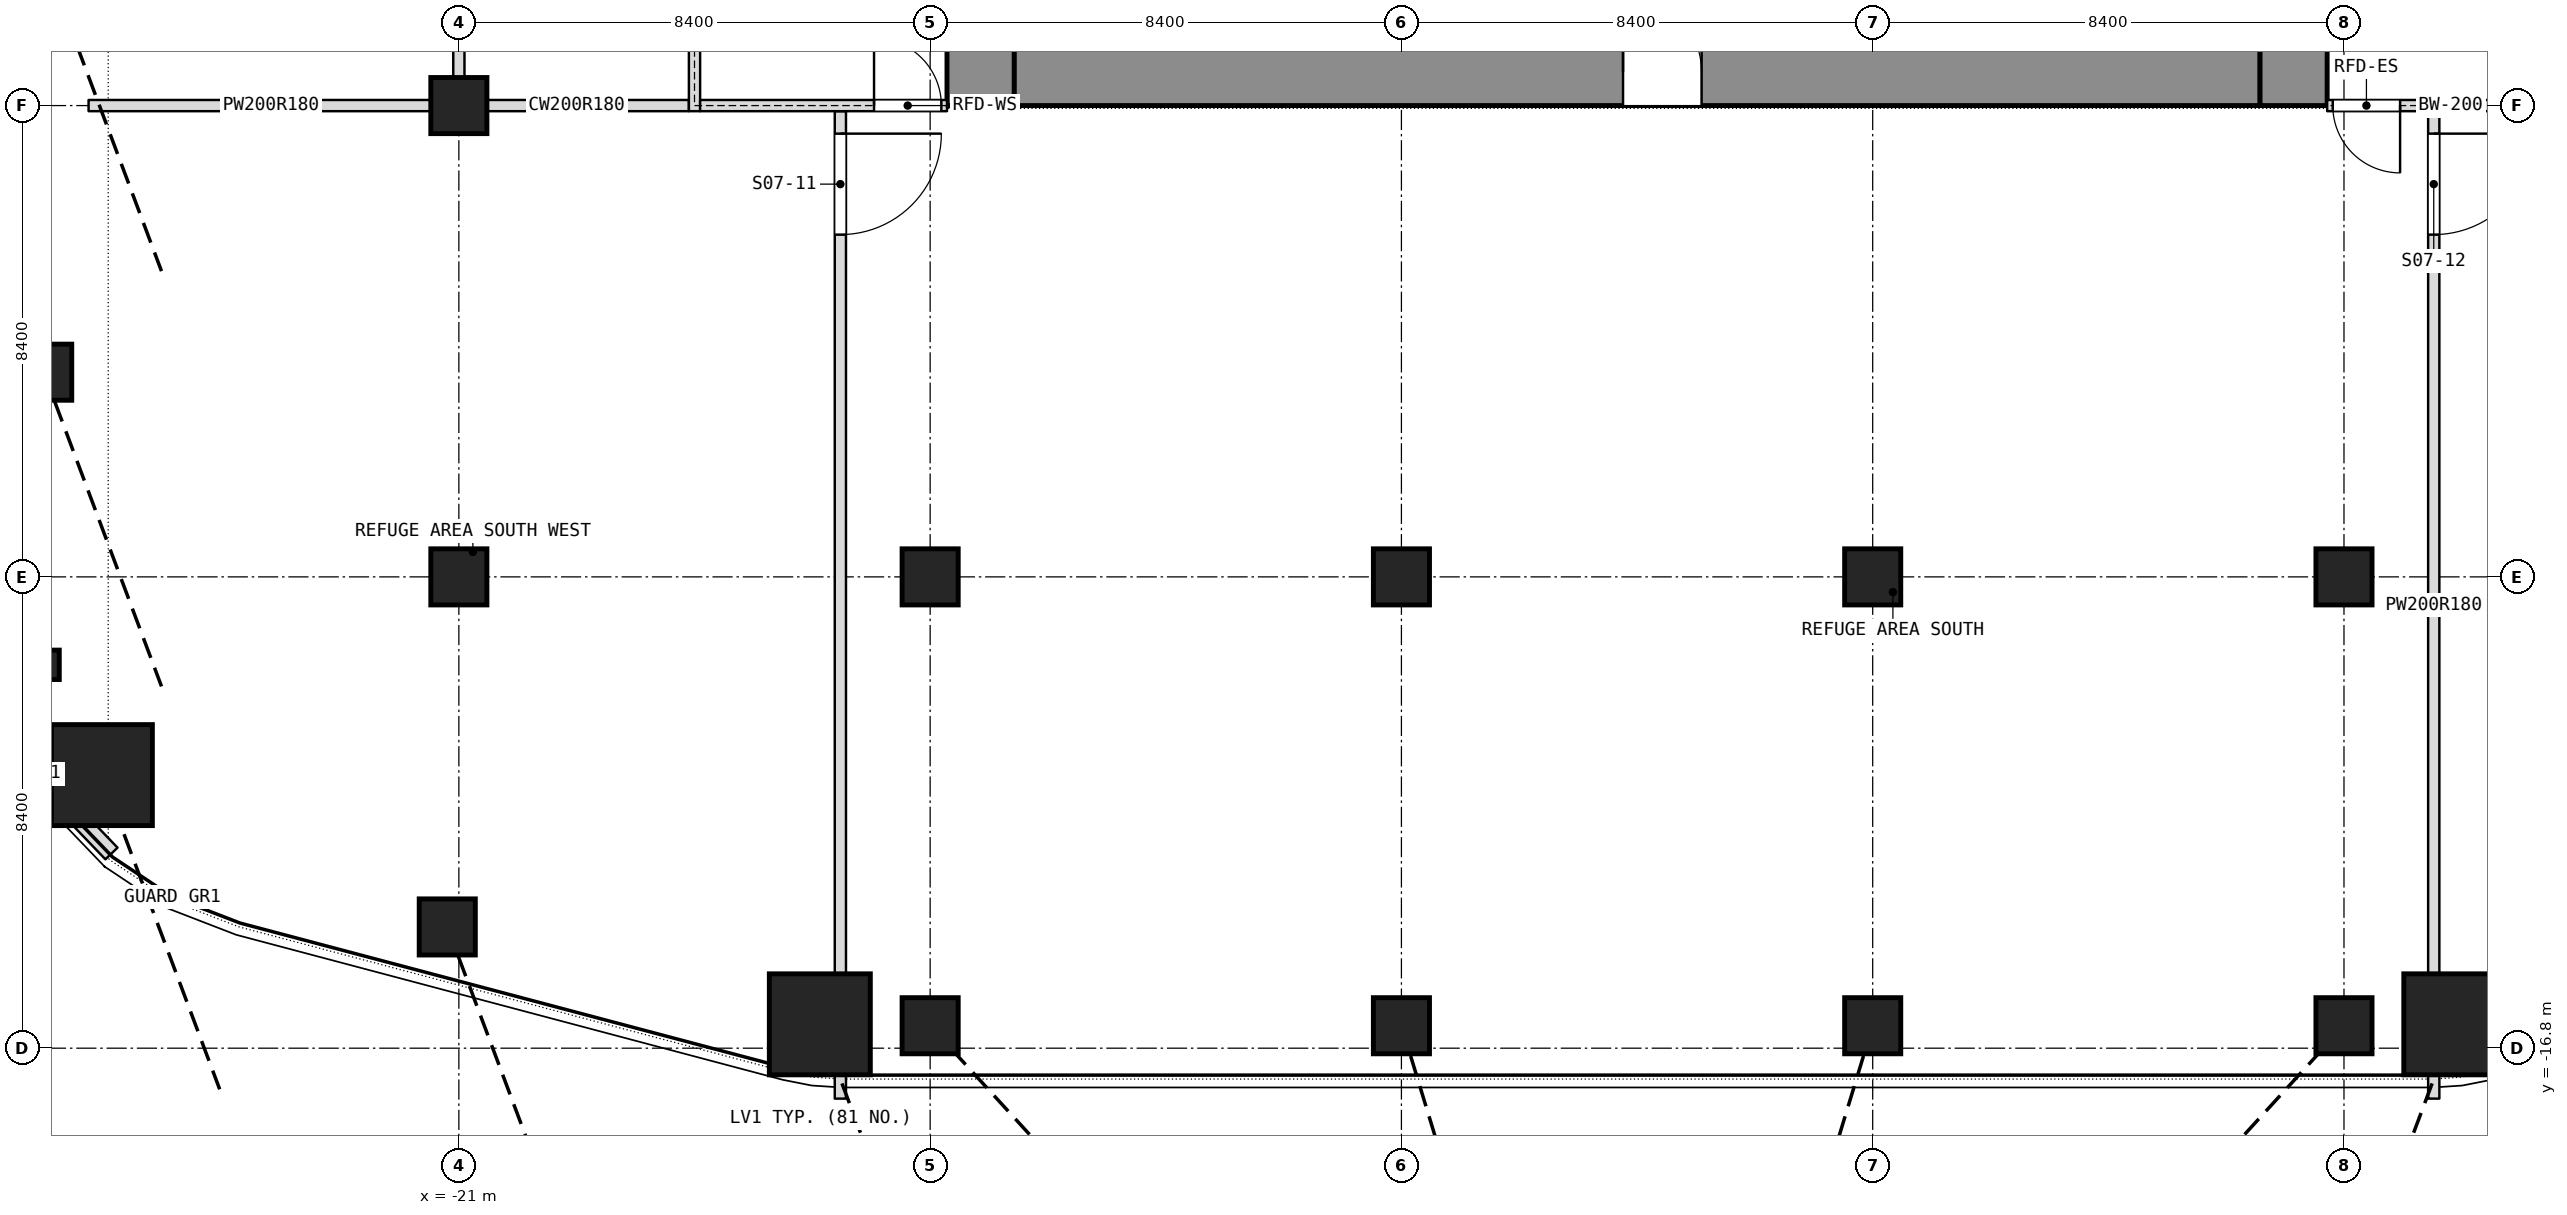
"""IFC4 building model, lengths in metres.
Left out: names, types, materials, properties, quantities, classifications, styles, units other than length and angle.
Written with IfcOpenShell. Run it as: python <this file> out.ifc"""

import sys

from ifc_helpers import new_model, si_unit, direction, frame, frame_2d, origin, origin_2d, place, context, subcontext, project, spatial, rectangle, i_section, extrude, element, fill, save


model = new_model("IFC4")
c1 = context("Model", 3, precision=1e-05, world=origin(), true_north=direction((0.0, 1.0)))
c2 = subcontext(c1, "Body", "Model", "MODEL_VIEW")
j1 = project(units=[si_unit("LENGTHUNIT", "METRE"), si_unit("PLANEANGLEUNIT", "RADIAN")], contexts=[c1])
p1 = place(None, origin())
s1 = spatial("IfcSite", under=j1, at=p1, CompositionType="ELEMENT")
p2 = place(p1, origin())
s2 = spatial("IfcBuilding", under=s1, at=p2, CompositionType="ELEMENT")
p3 = place(p2, frame((0.0, 0.0, 86.9)))
s3 = spatial("IfcBuildingStorey", under=s2, at=p3, CompositionType="ELEMENT", Elevation=86.9)
p4 = place(p3, frame((11.7, 0.0, 0.0), z_axis=(0.0, 0.0, 1.0), x_axis=(0.0, 1.0, 0.0)))
e1 = element("IfcWall", 1, at=p4, inside=s3, PredefinedType="SHEAR", context=c2, shape_type="SweptSolid", body=[
    extrude(rectangle(XDim=16.8, YDim=1.2, at=frame_2d((8.4, 0.0))), origin(), (0.0, 0.0, 1.0), 10.8),
])
p5 = place(p4, frame((6.825, 0.0, 0.0)))
e2 = element("IfcOpeningElement", 2, at=p5, cuts=e1, PredefinedType="OPENING", context=c2, shape_type="SweptSolid", body=[
    extrude(rectangle(XDim=1.2, YDim=2.1, at=frame_2d((0.6, 1.05))), frame((0.0, 0.6, 0.0), z_axis=(0.0, -1.0, 0.0), x_axis=(1.0, 0.0, 0.0)), (0.0, 0.0, 1.0), 1.2),
])
p6 = place(p4, frame((8.775, 0.0, 0.0)))
e3 = element("IfcOpeningElement", 3, at=p6, cuts=e1, PredefinedType="OPENING", context=c2, shape_type="SweptSolid", body=[
    extrude(rectangle(XDim=1.2, YDim=2.1, at=frame_2d((0.6, 1.05))), frame((0.0, 0.6, 0.0), z_axis=(0.0, -1.0, 0.0), x_axis=(1.0, 0.0, 0.0)), (0.0, 0.0, 1.0), 1.2),
])
p7 = place(p3, frame((-11.7, 0.0, 0.0), z_axis=(0.0, 0.0, 1.0), x_axis=(0.0, 1.0, 0.0)))
e4 = element("IfcWall", 4, at=p7, inside=s3, PredefinedType="SHEAR", context=c2, shape_type="SweptSolid", body=[
    extrude(rectangle(XDim=16.8, YDim=1.2, at=frame_2d((8.4, 0.0))), origin(), (0.0, 0.0, 1.0), 10.8),
])
p8 = place(p7, frame((6.825, 0.0, 0.0)))
e5 = element("IfcOpeningElement", 5, at=p8, cuts=e4, PredefinedType="OPENING", context=c2, shape_type="SweptSolid", body=[
    extrude(rectangle(XDim=1.2, YDim=2.1, at=frame_2d((0.6, 1.05))), frame((0.0, 0.6, 0.0), z_axis=(0.0, -1.0, 0.0), x_axis=(1.0, 0.0, 0.0)), (0.0, 0.0, 1.0), 1.2),
])
p9 = place(p7, frame((8.775, 0.0, 0.0)))
e6 = element("IfcOpeningElement", 6, at=p9, cuts=e4, PredefinedType="OPENING", context=c2, shape_type="SweptSolid", body=[
    extrude(rectangle(XDim=1.2, YDim=2.1, at=frame_2d((0.6, 1.05))), frame((0.0, 0.6, 0.0), z_axis=(0.0, -1.0, 0.0), x_axis=(1.0, 0.0, 0.0)), (0.0, 0.0, 1.0), 1.2),
])
p10 = place(p3, frame((-11.1, 0.6, 0.0), z_axis=(0.0, 0.0, 1.0), x_axis=(1.0, 0.0, 0.0)))
e7 = element("IfcWall", 7, at=p10, inside=s3, PredefinedType="SHEAR", context=c2, shape_type="SweptSolid", body=[
    extrude(rectangle(XDim=22.2, YDim=1.2, at=frame_2d((11.1, 0.0))), origin(), (0.0, 0.0, 1.0), 10.8),
])
p11 = place(p10, frame((10.85, 0.0, 0.0)))
e8 = element("IfcOpeningElement", 8, at=p11, cuts=e7, PredefinedType="OPENING", context=c2, shape_type="SweptSolid", body=[
    extrude(rectangle(XDim=1.4, YDim=2.1, at=frame_2d((0.7, 1.05))), frame((0.0, 0.6, 0.0), z_axis=(0.0, -1.0, 0.0), x_axis=(1.0, 0.0, 0.0)), (0.0, 0.0, 1.0), 1.2),
])
for number, where, z_axis, x_axis in (
    (9, (-21.0, -8.4, 0.0), (0.0, 0.0, 1.0), (1.0, 0.0, 0.0)),
    (10, (-21.0, 0.0, 0.0), (0.0, 0.0, 1.0), (1.0, 0.0, 0.0)),
    (11, (-12.6, -8.4, 0.0), (0.0, 0.0, 1.0), (1.0, 0.0, 0.0)),
    (12, (-4.2, -8.4, 0.0), (0.0, 0.0, 1.0), (1.0, 0.0, 0.0)),
    (13, (4.2, -8.4, 0.0), (0.0, 0.0, 1.0), (1.0, 0.0, 0.0)),
    (14, (12.6, -8.4, 0.0), (0.0, 0.0, 1.0), (1.0, 0.0, 0.0)),
):
    element("IfcColumn", number, at=place(p3, frame(where, z_axis=z_axis, x_axis=x_axis)), inside=s3, PredefinedType="COLUMN", context=c2, shape_type="SweptSolid", body=[
        extrude(rectangle(XDim=1.0, YDim=1.0, at=origin_2d()), origin(), (0.0, 0.0, 1.0), 10.8),
    ])
p12 = place(p3, frame((-27.358, -11.929, 0.0), z_axis=(0.0, 0.0, 1.0), x_axis=(1.0, 0.0, 0.0)))
e15 = element("IfcColumn", 15, at=p12, inside=s3, PredefinedType="COLUMN", context=c2, shape_type="SweptSolid", body=[
    extrude(i_section(OverallWidth=0.306, OverallDepth=0.524, WebThickness=0.024, FlangeThickness=0.04, FilletRadius=0.027, at=origin_2d()), origin(), (0.0, 0.0, 1.0), 10.14),
])
p13 = place(p3, frame((-28.275, -9.967, -0.3), z_axis=(0.0, 0.0, 1.0), x_axis=(1.0, 0.0, 0.0)))
e16 = element("IfcColumn", 16, at=p13, inside=s3, PredefinedType="COLUMN", context=c2, shape_type="SweptSolid", body=[
    extrude(i_section(OverallWidth=0.306, OverallDepth=0.524, WebThickness=0.024, FlangeThickness=0.04, FilletRadius=0.027, at=origin_2d()), origin(), (0.0, 0.0, 1.0), 10.44),
])
p14 = place(p3, frame((-28.4, -4.752, 0.0), z_axis=(0.0, 0.0, 1.0), x_axis=(1.0, 0.0, 0.0)))
e17 = element("IfcColumn", 17, at=p14, inside=s3, PredefinedType="COLUMN", context=c2, shape_type="SweptSolid", body=[
    extrude(i_section(OverallWidth=0.306, OverallDepth=0.524, WebThickness=0.024, FlangeThickness=0.04, FilletRadius=0.027, at=origin_2d()), origin(), (0.0, 0.0, 1.0), 10.14),
])
p15 = place(p3, frame((14.2, -17.699, 0.0), z_axis=(0.0, 0.0, 1.0), x_axis=(0.0, 1.0, 0.0)))
e18 = element("IfcWall", 18, at=p15, inside=s3, PredefinedType="PARTITIONING", context=c2, shape_type="SweptSolid", body=[
    extrude(rectangle(XDim=17.599, YDim=0.2, at=frame_2d((8.799, 0.0))), origin(), (0.0, 0.0, 1.0), 10.54),
])
p16 = place(p15, frame((15.399, 0.0, 0.0)))
e19 = element("IfcOpeningElement", 19, at=p16, cuts=e18, PredefinedType="OPENING", context=c2, shape_type="SweptSolid", body=[
    extrude(rectangle(XDim=1.8, YDim=2.1, at=frame_2d((0.9, 1.05))), frame((0.0, 0.1, 0.0), z_axis=(0.0, -1.0, 0.0), x_axis=(1.0, 0.0, 0.0)), (0.0, 0.0, 1.0), 0.2),
])
p17 = place(p3, frame((-27.6, 0.0, 0.0), z_axis=(0.0, 0.0, 1.0), x_axis=(1.0, 0.0, 0.0)))
e20 = element("IfcWall", 20, at=p17, inside=s3, PredefinedType="PARTITIONING", context=c2, shape_type="SweptSolid", body=[
    extrude(rectangle(XDim=6.5, YDim=0.2, at=frame_2d((3.25, 0.0))), origin(), (0.0, 0.0, 1.0), 10.09),
])
p18 = place(p3, frame((-20.9, 0.0, 0.0), z_axis=(0.0, 0.0, 1.0), x_axis=(1.0, 0.0, 0.0)))
e21 = element("IfcWall", 21, at=p18, inside=s3, PredefinedType="PARTITIONING", context=c2, shape_type="SweptSolid", body=[
    extrude(rectangle(XDim=4.0, YDim=0.2, at=frame_2d((2.0, 0.0))), origin(), (0.0, 0.0, 1.0), 10.09),
])
p19 = place(p3, frame((-14.2, -17.699, 0.0), z_axis=(0.0, 0.0, 1.0), x_axis=(0.0, 1.0, 0.0)))
e22 = element("IfcWall", 22, at=p19, inside=s3, PredefinedType="PARTITIONING", context=c2, shape_type="SweptSolid", body=[
    extrude(rectangle(XDim=17.599, YDim=0.2, at=frame_2d((8.799, 0.0))), origin(), (0.0, 0.0, 1.0), 10.54),
])
p20 = place(p19, frame((15.399, 0.0, 0.0)))
e23 = element("IfcOpeningElement", 23, at=p20, cuts=e22, PredefinedType="OPENING", context=c2, shape_type="SweptSolid", body=[
    extrude(rectangle(XDim=1.8, YDim=2.1, at=frame_2d((0.9, 1.05))), frame((0.0, 0.1, 0.0), z_axis=(0.0, -1.0, 0.0), x_axis=(1.0, 0.0, 0.0)), (0.0, 0.0, 1.0), 0.2),
])
p21 = place(p3, frame((-21.0, -0.1, 0.0), z_axis=(0.0, 0.0, 1.0), x_axis=(0.0, 1.0, 0.0)))
e24 = element("IfcWall", 24, at=p21, inside=s3, PredefinedType="PARTITIONING", context=c2, shape_type="SweptSolid", body=[
    extrude(rectangle(XDim=6.95, YDim=0.2, at=frame_2d((3.475, 0.0))), origin(), (0.0, 0.0, 1.0), 10.54),
])
p22 = place(p21, frame((2.975, 0.0, 0.0)))
e25 = element("IfcOpeningElement", 25, at=p22, cuts=e24, PredefinedType="OPENING", context=c2, shape_type="SweptSolid", body=[
    extrude(rectangle(XDim=1.0, YDim=2.1, at=frame_2d((0.5, 1.05))), frame((0.0, 0.1, 0.0), z_axis=(0.0, -1.0, 0.0), x_axis=(1.0, 0.0, 0.0)), (0.0, 0.0, 1.0), 0.2),
])
p23 = place(p3, frame((-28.027, -12.465, 10.8), z_axis=(0.0, 0.0, 1.0), x_axis=(-0.519615563943, 0.854400178902, 0.0)))
e26 = element("IfcWall", 26, at=p23, inside=s3, PredefinedType="PARAPET", context=c2, shape_type="SweptSolid", body=[
    extrude(rectangle(XDim=1.309, YDim=0.3, at=frame_2d((0.655, 0.0))), origin(), (0.0, 0.0, 1.0), 1.1),
])
p24 = place(p3, frame((-27.192, -13.33, 10.8), z_axis=(0.0, 0.0, 1.0), x_axis=(-0.692433097882, 0.721482089146, 0.0)))
e27 = element("IfcWall", 27, at=p24, inside=s3, PredefinedType="PARAPET", context=c2, shape_type="SweptSolid", body=[
    extrude(rectangle(XDim=1.235, YDim=0.3, at=frame_2d((0.618, 0.0))), origin(), (0.0, 0.0, 1.0), 1.1),
])
p25 = place(p3, frame((-16.8, -0.1, 0.0), z_axis=(0.0, 0.0, 1.0), x_axis=(0.0, 1.0, 0.0)))
e28 = element("IfcWall", 28, at=p25, inside=s3, PredefinedType="PARTITIONING", context=c2, shape_type="SweptSolid", body=[
    extrude(rectangle(XDim=17.0, YDim=0.2, at=frame_2d((8.5, 0.0))), origin(), (0.0, 0.0, 1.0), 10.54),
])
p26 = place(p25, frame((2.2, 0.0, 0.0)))
e29 = element("IfcOpeningElement", 29, at=p26, cuts=e28, PredefinedType="OPENING", context=c2, shape_type="SweptSolid", body=[
    extrude(rectangle(XDim=1.8, YDim=2.1, at=frame_2d((0.9, 1.05))), frame((0.0, 0.1, 0.0), z_axis=(0.0, -1.0, 0.0), x_axis=(1.0, 0.0, 0.0)), (0.0, 0.0, 1.0), 0.2),
])
p27 = place(p25, frame((7.2, 0.0, 0.0)))
e30 = element("IfcOpeningElement", 30, at=p27, cuts=e28, PredefinedType="OPENING", context=c2, shape_type="SweptSolid", body=[
    extrude(rectangle(XDim=1.8, YDim=2.1, at=frame_2d((0.9, 1.05))), frame((0.0, 0.1, 0.0), z_axis=(0.0, -1.0, 0.0), x_axis=(1.0, 0.0, 0.0)), (0.0, 0.0, 1.0), 0.2),
])
p28 = place(p3, frame((-16.7, 0.0, 0.0), z_axis=(0.0, 0.0, 1.0), x_axis=(1.0, 0.0, 0.0)))
e31 = element("IfcWall", 31, at=p28, inside=s3, PredefinedType="PARTITIONING", context=c2, shape_type="SweptSolid", body=[
    extrude(rectangle(XDim=4.4, YDim=0.2, at=frame_2d((2.2, 0.0))), origin(), (0.0, 0.0, 1.0), 10.09),
])
p29 = place(p28, frame((3.1, 0.0, 0.0)))
e32 = element("IfcOpeningElement", 32, at=p29, cuts=e31, PredefinedType="OPENING", context=c2, shape_type="SweptSolid", body=[
    extrude(rectangle(XDim=1.2, YDim=2.1, at=frame_2d((0.6, 1.05))), frame((0.0, 0.1, 0.0), z_axis=(0.0, -1.0, 0.0), x_axis=(1.0, 0.0, 0.0)), (0.0, 0.0, 1.0), 0.2),
])
p30 = place(p3, frame((12.3, 0.0, 0.0), z_axis=(0.0, 0.0, 1.0), x_axis=(1.0, 0.0, 0.0)))
e33 = element("IfcWall", 33, at=p30, inside=s3, PredefinedType="PARTITIONING", context=c2, shape_type="SweptSolid", body=[
    extrude(rectangle(XDim=4.4, YDim=0.2, at=frame_2d((2.2, 0.0))), origin(), (0.0, 0.0, 1.0), 10.09),
])
p31 = place(p30, frame((0.1, 0.0, 0.0)))
e34 = element("IfcOpeningElement", 34, at=p31, cuts=e33, PredefinedType="OPENING", context=c2, shape_type="SweptSolid", body=[
    extrude(rectangle(XDim=1.2, YDim=2.1, at=frame_2d((0.6, 1.05))), frame((0.0, 0.1, 0.0), z_axis=(0.0, -1.0, 0.0), x_axis=(1.0, 0.0, 0.0)), (0.0, 0.0, 1.0), 0.2),
])
p32 = place(p20, origin())
e35 = element("IfcDoor", 35, at=p32, inside=s3, OperationType="DOUBLE_DOOR_SINGLE_SWING", PredefinedType="DOOR", context=c2, shape_type="SweptSolid", body=[
    extrude(rectangle(XDim=1.8, YDim=2.1, at=frame_2d((0.9, 1.05))), frame((0.0, 0.025, 0.0), z_axis=(0.0, -1.0, 0.0), x_axis=(1.0, 0.0, 0.0)), (0.0, 0.0, 1.0), 0.05),
])
fill(e23, e35)
p33 = place(p16, origin())
e36 = element("IfcDoor", 36, at=p33, inside=s3, OperationType="DOUBLE_DOOR_SINGLE_SWING", PredefinedType="DOOR", context=c2, shape_type="SweptSolid", body=[
    extrude(rectangle(XDim=1.8, YDim=2.1, at=frame_2d((0.9, 1.05))), frame((0.0, 0.025, 0.0), z_axis=(0.0, -1.0, 0.0), x_axis=(1.0, 0.0, 0.0)), (0.0, 0.0, 1.0), 0.05),
])
fill(e19, e36)
p34 = place(p11, origin())
e37 = element("IfcDoor", 37, at=p34, inside=s3, OperationType="SINGLE_SWING_LEFT", PredefinedType="DOOR", context=c2, shape_type="SweptSolid", body=[
    extrude(rectangle(XDim=1.4, YDim=2.1, at=frame_2d((0.7, 1.05))), frame((0.0, 0.025, 0.0), z_axis=(0.0, -1.0, 0.0), x_axis=(1.0, 0.0, 0.0)), (0.0, 0.0, 1.0), 0.05),
])
fill(e8, e37)
p35 = place(p29, origin())
e38 = element("IfcDoor", 38, at=p35, inside=s3, OperationType="SINGLE_SWING_LEFT", PredefinedType="DOOR", context=c2, shape_type="SweptSolid", body=[
    extrude(rectangle(XDim=1.2, YDim=2.1, at=frame_2d((0.6, 1.05))), frame((0.0, 0.025, 0.0), z_axis=(0.0, -1.0, 0.0), x_axis=(1.0, 0.0, 0.0)), (0.0, 0.0, 1.0), 0.05),
])
fill(e32, e38)
p36 = place(p31, origin())
e39 = element("IfcDoor", 39, at=p36, inside=s3, OperationType="SINGLE_SWING_LEFT", PredefinedType="DOOR", context=c2, shape_type="SweptSolid", body=[
    extrude(rectangle(XDim=1.2, YDim=2.1, at=frame_2d((0.6, 1.05))), frame((0.0, 0.025, 0.0), z_axis=(0.0, -1.0, 0.0), x_axis=(1.0, 0.0, 0.0)), (0.0, 0.0, 1.0), 0.05),
])
fill(e34, e39)
save(model, sys.argv[1])
